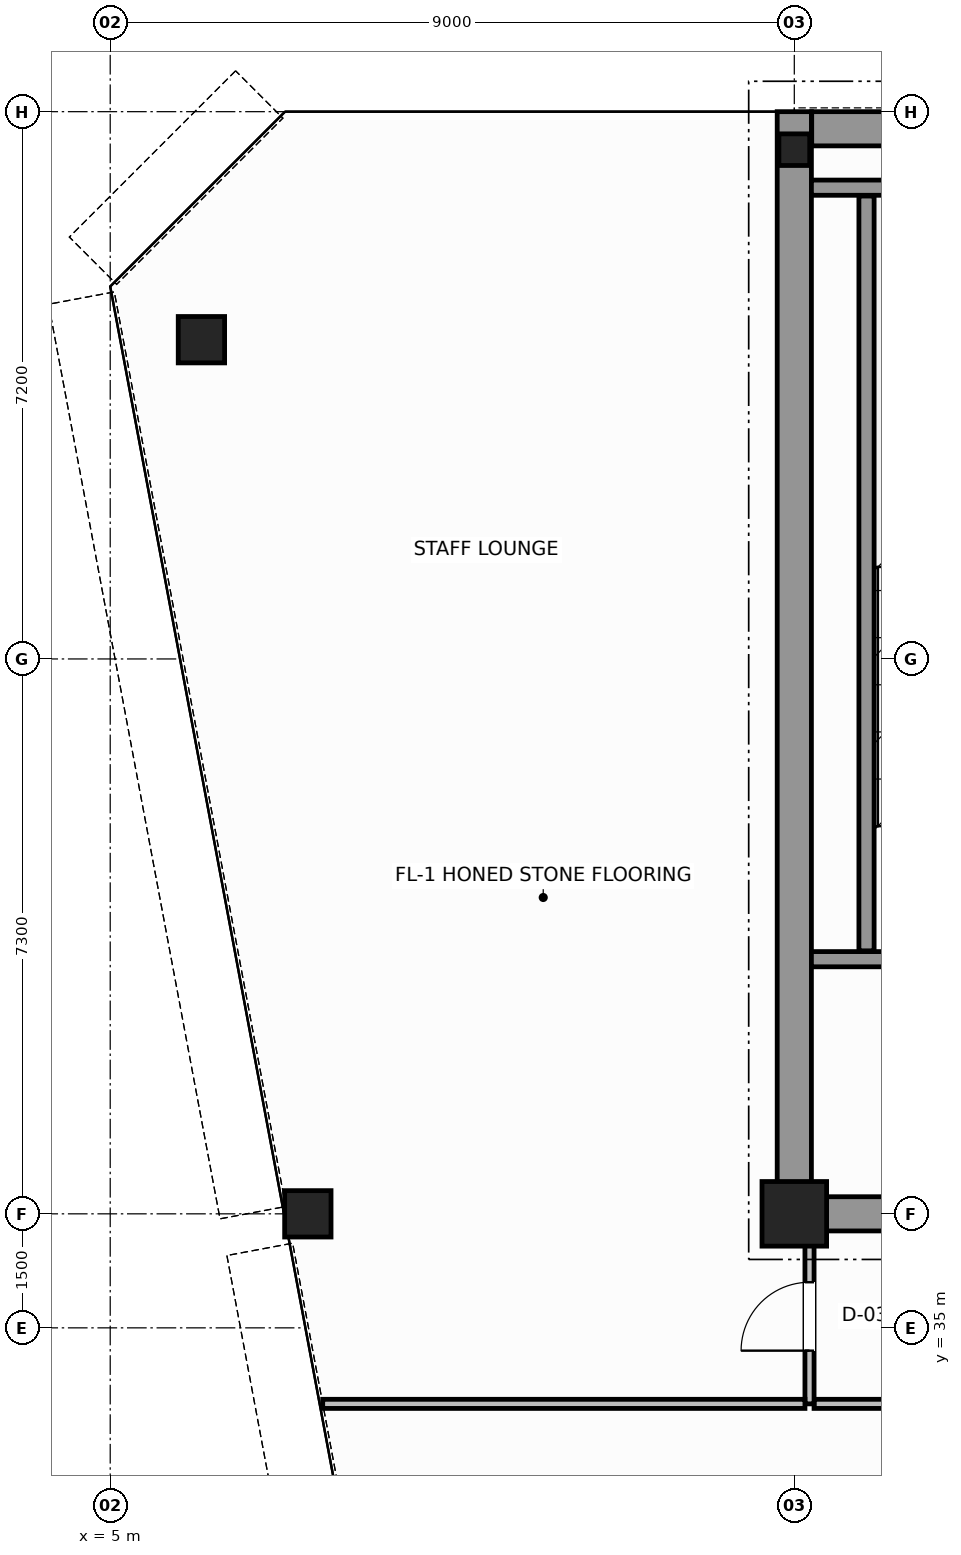
"""IFC4 building model, lengths in metres.
Left out: names, types, materials, properties, quantities, classifications, styles, units other than length and angle.
Written with IfcOpenShell. Run it as: python <this file> out.ifc"""

import sys

from ifc_helpers import new_model, si_unit, direction, frame, frame_2d, origin, origin_2d, place, context, subcontext, project, spatial, rectangle, hollow_circle, i_section, extrude, source, transform, mapped, element, fill, save


model = new_model("IFC4")
c1 = context("Model", 3, precision=1e-05, world=origin(), true_north=direction((0.0, 1.0)))
c2 = subcontext(c1, "Body", "Model", "MODEL_VIEW")
j1 = project(units=[si_unit("LENGTHUNIT", "METRE"), si_unit("PLANEANGLEUNIT", "RADIAN")], contexts=[c1])
p1 = place(None, origin())
s1 = spatial("IfcSite", under=j1, at=p1, CompositionType="ELEMENT")
p2 = place(p1, origin())
s2 = spatial("IfcBuilding", under=s1, at=p2, CompositionType="ELEMENT")
p3 = place(p2, frame((0.0, 0.0, 280.2)))
s3 = spatial("IfcBuildingStorey", under=s2, at=p3, CompositionType="ELEMENT", Elevation=280.2)
m1 = source(origin(), c2, "Body", "SweptSolid", [
    extrude(rectangle(XDim=0.85, YDim=0.85, at=origin_2d()), origin(), (0.0, 0.0, 1.0), 3.8),
])
p4 = place(p3, frame((14.0, 36.5, 0.0), z_axis=(0.0, 0.0, 1.0), x_axis=(1.0, 0.0, 0.0)))
e1 = element("IfcColumn", 1, at=p4, inside=s3, PredefinedType="COLUMN", context=c2, shape_type="MappedRepresentation", body=[
    mapped(m1, transform((0.0, 0.0, 0.0), scale=1.0)),
])
m2 = source(origin(), c2, "Body", "SweptSolid", [
    extrude(i_section(OverallWidth=0.406, OverallDepth=0.416, WebThickness=0.03, FlangeThickness=0.042, FilletRadius=0.015, at=origin_2d()), origin(), (0.0, 0.0, 1.0), 3.8),
])
p5 = place(p3, frame((14.0, 50.5, 0.0), z_axis=(0.0, 0.0, 1.0), x_axis=(1.0, 0.0, 0.0)))
e2 = element("IfcColumn", 2, at=p5, inside=s3, PredefinedType="COLUMN", context=c2, shape_type="MappedRepresentation", body=[
    mapped(m2, transform((0.0, 0.0, 0.0), scale=1.0)),
])
m3 = source(origin(), c2, "Body", "SweptSolid", [
    extrude(hollow_circle(Radius=0.305, WallThickness=0.03, at=origin_2d()), origin(), (0.0, 0.0, 1.0), 3.8),
])
for number, where, z_axis, x_axis in (
    (3, (6.2, 48.0, 0.0), (0.0, 0.0, 1.0), (1.0, 0.0, 0.0)),
    (4, (7.6, 36.5, 0.0), (0.0, 0.0, 1.0), (1.0, 0.0, 0.0)),
):
    element("IfcColumn", number, at=place(p3, frame(where, z_axis=z_axis, x_axis=x_axis)), inside=s3, PredefinedType="COLUMN", context=c2, shape_type="MappedRepresentation", body=[
        mapped(m3, transform((0.0, 0.0, 0.0), scale=1.0)),
    ])
p6 = place(p3, frame((14.229, 50.775, 0.0), z_axis=(0.0, 0.0, 1.0), x_axis=(1.0, 0.0, 0.0)))
e5 = element("IfcWall", 5, at=p6, inside=s3, PredefinedType="SHEAR", context=c2, shape_type="SweptSolid", body=[
    extrude(rectangle(XDim=19.769, YDim=0.45, at=frame_2d((9.885, 0.0))), origin(), (0.0, 0.0, 1.0), 3.8),
])
p7 = place(p3, frame((14.0, 36.5, 0.0), z_axis=(0.0, 0.0, 1.0), x_axis=(0.0, 1.0, 0.0)))
e6 = element("IfcWall", 6, at=p7, inside=s3, PredefinedType="SHEAR", context=c2, shape_type="SweptSolid", body=[
    extrude(rectangle(XDim=14.5, YDim=0.45, at=frame_2d((7.25, 0.0))), origin(), (0.0, 0.0, 1.0), 3.8),
])
p8 = place(p3, frame((14.245, 36.5, 0.0), z_axis=(0.0, 0.0, 1.0), x_axis=(1.0, 0.0, 0.0)))
e7 = element("IfcWall", 7, at=p8, inside=s3, PredefinedType="SHEAR", context=c2, shape_type="SweptSolid", body=[
    extrude(rectangle(XDim=3.955, YDim=0.45, at=frame_2d((1.978, 0.0))), origin(), (0.0, 0.0, 1.0), 2.58),
])
p9 = place(p3, frame((14.225, 39.85, 0.0), z_axis=(0.0, 0.0, 1.0), x_axis=(1.0, 0.0, 0.0)))
e8 = element("IfcWall", 8, at=p9, inside=s3, PredefinedType="SOLIDWALL", context=c2, shape_type="SweptSolid", body=[
    extrude(rectangle(XDim=4.375, YDim=0.2, at=frame_2d((2.188, 0.0))), origin(), (0.0, 0.0, 1.0), 3.8),
])
p10 = place(p9, frame((1.95, 0.0, 0.0)))
e9 = element("IfcOpeningElement", 9, at=p10, cuts=e8, PredefinedType="OPENING", context=c2, shape_type="SweptSolid", body=[
    extrude(rectangle(XDim=1.1, YDim=2.15, at=frame_2d((0.55, 1.075))), frame((0.0, 0.11, 0.0), z_axis=(0.0, -1.0, 0.0), x_axis=(1.0, 0.0, 0.0)), (0.0, 0.0, 1.0), 0.22),
])
p11 = place(p3, frame((14.225, 50.0, 0.0), z_axis=(0.0, 0.0, 1.0), x_axis=(1.0, 0.0, 0.0)))
e10 = element("IfcWall", 10, at=p11, inside=s3, PredefinedType="SOLIDWALL", context=c2, shape_type="SweptSolid", body=[
    extrude(rectangle(XDim=4.375, YDim=0.2, at=frame_2d((2.188, 0.0))), origin(), (0.0, 0.0, 1.0), 3.8),
])
p12 = place(p3, frame((14.95, 39.96, 0.0), z_axis=(0.0, 0.0, 1.0), x_axis=(0.0, 1.0, 0.0)))
e11 = element("IfcWall", 11, at=p12, inside=s3, PredefinedType="SOLIDWALL", context=c2, shape_type="SweptSolid", body=[
    extrude(rectangle(XDim=9.93, YDim=0.2, at=frame_2d((4.965, 0.0))), origin(), (0.0, 0.0, 1.0), 3.8),
])
p13 = place(p3, frame((14.26, 34.0, 0.0), z_axis=(0.0, 0.0, 1.0), x_axis=(1.0, 0.0, 0.0)))
e12 = element("IfcWall", 12, at=p13, inside=s3, PredefinedType="PARTITIONING", context=c2, shape_type="SweptSolid", body=[
    extrude(rectangle(XDim=20.88, YDim=0.12, at=frame_2d((10.44, 0.0))), origin(), (0.0, 0.0, 1.0), 3.58),
])
p14 = place(p3, frame((14.2, 34.0, 0.0), z_axis=(0.0, 0.0, 1.0), x_axis=(0.0, 1.0, 0.0)))
e13 = element("IfcWall", 13, at=p14, inside=s3, PredefinedType="PARTITIONING", context=c2, shape_type="SweptSolid", body=[
    extrude(rectangle(XDim=2.44, YDim=0.12, at=frame_2d((1.22, 0.0))), origin(), (0.0, 0.0, 1.0), 3.58),
])
p15 = place(p14, frame((0.7, 0.0, 0.0)))
e14 = element("IfcOpeningElement", 14, at=p15, cuts=e13, PredefinedType="OPENING", context=c2, shape_type="SweptSolid", body=[
    extrude(rectangle(XDim=0.9, YDim=2.15, at=frame_2d((0.45, 1.075))), frame((0.0, 0.07, 0.0), z_axis=(0.0, -1.0, 0.0), x_axis=(1.0, 0.0, 0.0)), (0.0, 0.0, 1.0), 0.14),
])
p16 = place(p3, frame((7.796, 34.0, 0.0), z_axis=(0.0, 0.0, 1.0), x_axis=(1.0, 0.0, 0.0)))
e15 = element("IfcWall", 15, at=p16, inside=s3, PredefinedType="PARTITIONING", context=c2, shape_type="SweptSolid", body=[
    extrude(rectangle(XDim=6.344, YDim=0.12, at=frame_2d((3.172, 0.0))), origin(), (0.0, 0.0, 1.0), 3.58),
])
m4 = source(origin(), c2, "Body", "SweptSolid", [
    extrude(rectangle(XDim=0.9, YDim=2.15, at=frame_2d((0.45, 1.075))), frame((0.0, 0.025, 0.0), z_axis=(0.0, -1.0, 0.0), x_axis=(1.0, 0.0, 0.0)), (0.0, 0.0, 1.0), 0.05),
])
p17 = place(p15, origin())
e16 = element("IfcDoor", 16, at=p17, inside=s3, OperationType="SINGLE_SWING_LEFT", PredefinedType="DOOR", context=c2, shape_type="MappedRepresentation", body=[
    mapped(m4, transform((0.0, 0.0, 0.0), scale=1.0)),
])
fill(e14, e16)
save(model, sys.argv[1])
